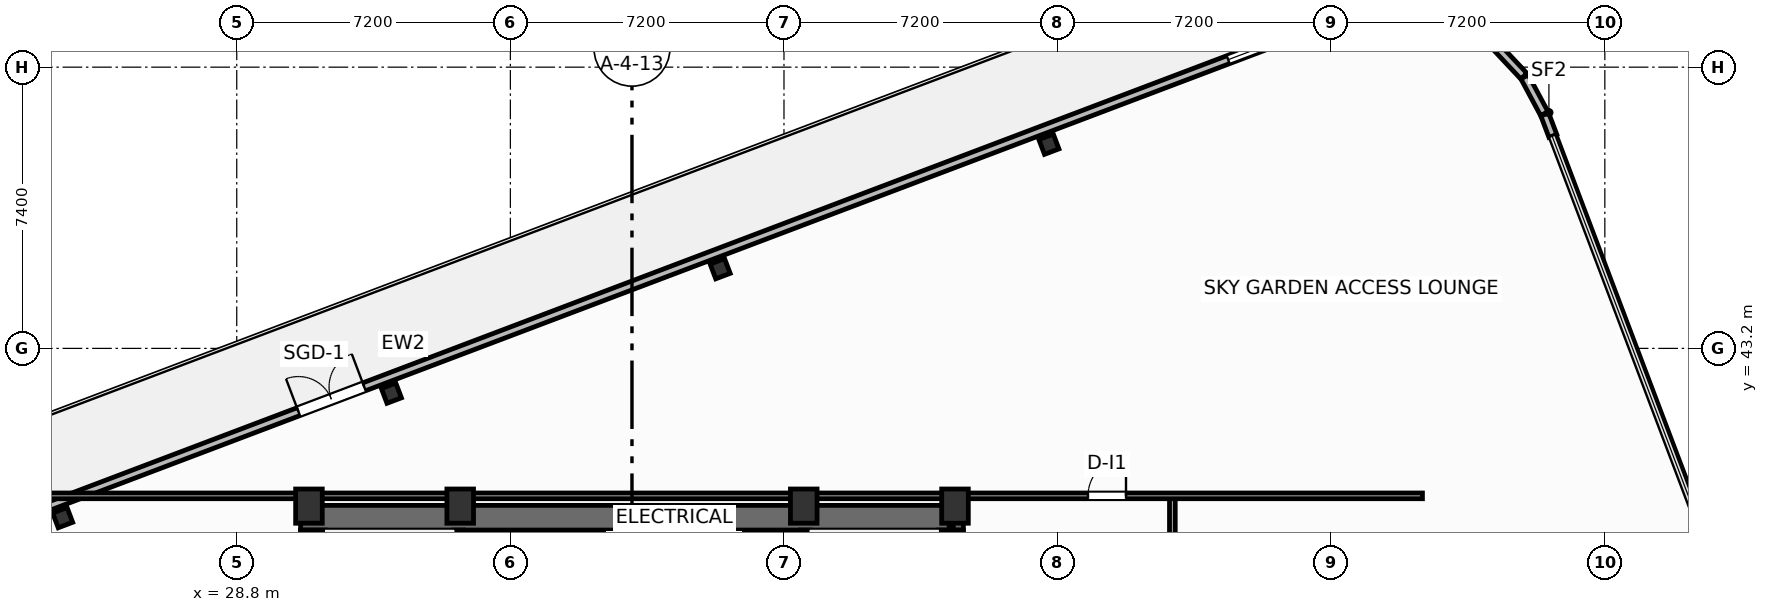
"""IFC4 building model, lengths in metres.
Left out: names, types, materials, properties, quantities, classifications, styles, units other than length and angle.
Written with IfcOpenShell. Run it as: python <this file> out.ifc"""

import sys

from ifc_helpers import new_model, si_unit, direction, frame, frame_2d, origin, origin_2d, place, context, subcontext, project, spatial, rectangle, i_section, extrude, element, fill, save


model = new_model("IFC4")
c1 = context("Model", 3, precision=1e-05, world=origin(), true_north=direction((0.0, 1.0)))
c2 = subcontext(c1, "Body", "Model", "MODEL_VIEW")
j1 = project(units=[si_unit("LENGTHUNIT", "METRE"), si_unit("PLANEANGLEUNIT", "RADIAN")], contexts=[c1])
p1 = place(None, origin())
s1 = spatial("IfcSite", under=j1, at=p1, CompositionType="ELEMENT")
p2 = place(p1, origin())
s2 = spatial("IfcBuilding", under=s1, at=p2, CompositionType="ELEMENT")
p3 = place(p2, frame((0.0, 0.0, 207.9)))
s3 = spatial("IfcBuildingStorey", under=s2, at=p3, CompositionType="ELEMENT", Elevation=207.9)
for number, where, z_axis, x_axis in (
    (1, (30.7, 39.05, 0.0), (0.0, 0.0, 1.0), (1.0, 0.0, 0.0)),
    (2, (34.68, 39.05, 0.0), (0.0, 0.0, 1.0), (1.0, 0.0, 0.0)),
    (3, (43.72, 39.05, 0.0), (0.0, 0.0, 1.0), (1.0, 0.0, 0.0)),
    (4, (47.7, 39.05, 0.0), (0.0, 0.0, 1.0), (1.0, 0.0, 0.0)),
):
    element("IfcColumn", number, at=place(p3, frame(where, z_axis=z_axis, x_axis=x_axis)), inside=s3, PredefinedType="COLUMN", context=c2, shape_type="SweptSolid", body=[
        extrude(rectangle(XDim=0.7, YDim=0.9, at=origin_2d()), origin(), (0.0, 0.0, 1.0), 4.8),
    ])
p4 = place(p3, frame((30.48, 38.745, 0.0), z_axis=(0.0, 0.0, 1.0), x_axis=(1.0, 0.0, 0.0)))
e5 = element("IfcWall", 5, at=p4, inside=s3, PredefinedType="SHEAR", context=c2, shape_type="SweptSolid", body=[
    extrude(rectangle(XDim=17.44, YDim=0.65, at=frame_2d((8.72, 0.0))), origin(), (0.0, 0.0, 1.0), 4.55),
])
for number, where, z_axis, x_axis in (
    (6, (30.805, 29.2, 0.0), (0.0, 0.0, 1.0), (0.0, 1.0, 0.0)),
    (7, (47.595, 29.2, 0.0), (0.0, 0.0, 1.0), (0.0, 1.0, 0.0)),
):
    element("IfcWall", number, at=place(p3, frame(where, z_axis=z_axis, x_axis=x_axis)), inside=s3, PredefinedType="SHEAR", context=c2, shape_type="SweptSolid", body=[
        extrude(rectangle(XDim=9.22, YDim=0.65, at=frame_2d((4.61, 0.0))), origin(), (0.0, 0.0, 1.0), 4.55),
    ])
p5 = place(p3, frame((34.64, 29.2, 0.0), z_axis=(0.0, 0.0, 1.0), x_axis=(0.0, 1.0, 0.0)))
e8 = element("IfcWall", 8, at=p5, inside=s3, PredefinedType="SHEAR", context=c2, shape_type="SweptSolid", body=[
    extrude(rectangle(XDim=9.22, YDim=0.25, at=frame_2d((4.61, 0.0))), origin(), (0.0, 0.0, 1.0), 4.55),
])
p6 = place(p5, frame((0.65, 0.0, 0.0)))
e9 = element("IfcOpeningElement", 9, at=p6, cuts=e8, PredefinedType="OPENING", context=c2, shape_type="SweptSolid", body=[
    extrude(rectangle(XDim=1.05, YDim=2.15, at=frame_2d((0.525, 1.075))), frame((0.0, 0.135, 0.0), z_axis=(0.0, -1.0, 0.0), x_axis=(1.0, 0.0, 0.0)), (0.0, 0.0, 1.0), 0.27),
])
p7 = place(p3, frame((43.76, 29.2, 0.0), z_axis=(0.0, 0.0, 1.0), x_axis=(0.0, 1.0, 0.0)))
e10 = element("IfcWall", 10, at=p7, inside=s3, PredefinedType="SHEAR", context=c2, shape_type="SweptSolid", body=[
    extrude(rectangle(XDim=9.22, YDim=0.25, at=frame_2d((4.61, 0.0))), origin(), (0.0, 0.0, 1.0), 4.55),
])
p8 = place(p7, frame((0.65, 0.0, 0.0)))
e11 = element("IfcOpeningElement", 11, at=p8, cuts=e10, PredefinedType="OPENING", context=c2, shape_type="SweptSolid", body=[
    extrude(rectangle(XDim=1.05, YDim=2.15, at=frame_2d((0.525, 1.075))), frame((0.0, 0.135, 0.0), z_axis=(0.0, -1.0, 0.0), x_axis=(1.0, 0.0, 0.0)), (0.0, 0.0, 1.0), 0.27),
])
for number, where, z_axis, x_axis in (
    (12, (50.171, 48.572, -0.32), (0.0, 0.0, 1.0), (0.935, 0.354, 0.0)),
    (13, (41.52, 45.297, -0.32), (0.0, 0.0, 1.0), (0.935, 0.354, 0.0)),
    (14, (32.869, 42.022, -0.32), (0.0, 0.0, 1.0), (0.935, 0.354, 0.0)),
    (15, (24.219, 38.747, -0.32), (0.0, 0.0, 1.0), (0.935, 0.354, 0.0)),
):
    element("IfcColumn", number, at=place(p3, frame(where, z_axis=z_axis, x_axis=x_axis)), inside=s3, PredefinedType="COLUMN", context=c2, shape_type="SweptSolid", body=[
        extrude(i_section(OverallWidth=0.406, OverallDepth=0.416, WebThickness=0.03, FlangeThickness=0.048, FilletRadius=0.025, at=origin_2d()), origin(), (0.0, 0.0, 1.0), 5.12),
    ])
p9 = place(p3, frame((8.315, 33.164, 0.0), z_axis=(0.0, 0.0, 1.0), x_axis=(0.935222646765, 0.354060165759, 0.0)))
e16 = element("IfcWall", 16, at=p9, inside=s3, PredefinedType="SOLIDWALL", context=c2, shape_type="SweptSolid", body=[
    extrude(rectangle(XDim=52.2, YDim=0.22, at=frame_2d((26.1, 0.0))), origin(), (0.0, 0.0, 1.0), 3.83),
])
p10 = place(p9, frame((23.64, 0.0, 0.0)))
e17 = element("IfcOpeningElement", 17, at=p10, cuts=e16, PredefinedType="OPENING", context=c2, shape_type="SweptSolid", body=[
    extrude(rectangle(XDim=1.85, YDim=2.3, at=frame_2d((0.925, 1.15))), frame((0.0, 0.12, 0.0), z_axis=(0.0, -1.0, 0.0), x_axis=(1.0, 0.0, 0.0)), (0.0, 0.0, 1.0), 0.24),
])
p11 = place(p9, frame((0.55, 0.0, 0.75)))
e18 = element("IfcOpeningElement", 18, at=p11, cuts=e16, PredefinedType="OPENING", context=c2, shape_type="SweptSolid", body=[
    extrude(rectangle(XDim=1.85, YDim=1.75, at=frame_2d((0.925, 0.875))), frame((0.0, 0.12, 0.0), z_axis=(0.0, -1.0, 0.0), x_axis=(1.0, 0.0, 0.0)), (0.0, 0.0, 1.0), 0.24),
])
p12 = place(p9, frame((49.8, 0.0, 0.75)))
e19 = element("IfcOpeningElement", 19, at=p12, cuts=e16, PredefinedType="OPENING", context=c2, shape_type="SweptSolid", body=[
    extrude(rectangle(XDim=1.85, YDim=1.75, at=frame_2d((0.925, 0.875))), frame((0.0, 0.12, 0.0), z_axis=(0.0, -1.0, 0.0), x_axis=(1.0, 0.0, 0.0)), (0.0, 0.0, 1.0), 0.24),
])
p13 = place(p3, frame((63.432, 48.792, 0.0), z_axis=(0.0, 0.0, 1.0), x_axis=(-0.354409739857, 0.935090228959, 0.0)))
e20 = element("IfcWall", 20, at=p13, inside=s3, PredefinedType="SOLIDWALL", context=c2, shape_type="SweptSolid", body=[
    extrude(rectangle(XDim=0.602, YDim=0.22, at=frame_2d((0.301, 0.0))), origin(), (0.0, 0.0, 1.0), 3.83),
])
p14 = place(p3, frame((63.207, 49.377, 0.0), z_axis=(0.0, 0.0, 1.0), x_axis=(-0.473040490473, 0.881040688262, 0.0)))
e21 = element("IfcWall", 21, at=p14, inside=s3, PredefinedType="SOLIDWALL", context=c2, shape_type="SweptSolid", body=[
    extrude(rectangle(XDim=1.1, YDim=0.22, at=frame_2d((0.55, 0.0))), origin(), (0.0, 0.0, 1.0), 3.83),
])
p15 = place(p3, frame((62.67, 50.364, 0.0), z_axis=(0.0, 0.0, 1.0), x_axis=(-0.685085671623, 0.728462505923, 0.0)))
e22 = element("IfcWall", 22, at=p15, inside=s3, PredefinedType="SOLIDWALL", context=c2, shape_type="SweptSolid", body=[
    extrude(rectangle(XDim=1.092, YDim=0.22, at=frame_2d((0.546, 0.0))), origin(), (0.0, 0.0, 1.0), 3.83),
])
p16 = place(p3, frame((53.42, 19.3, 0.0), z_axis=(0.0, 0.0, 1.0), x_axis=(0.0, 1.0, 0.0)))
e23 = element("IfcWall", 23, at=p16, inside=s3, PredefinedType="PARTITIONING", context=c2, shape_type="SweptSolid", body=[
    extrude(rectangle(XDim=20.02, YDim=0.15, at=frame_2d((10.01, 0.0))), origin(), (0.0, 0.0, 1.0), 4.55),
])
p17 = place(p16, frame((7.8, 0.0, 0.0)))
e24 = element("IfcOpeningElement", 24, at=p17, cuts=e23, PredefinedType="OPENING", context=c2, shape_type="SweptSolid", body=[
    extrude(rectangle(XDim=1.0, YDim=2.05, at=frame_2d((0.5, 1.025))), frame((0.0, 0.085, 0.0), z_axis=(0.0, -1.0, 0.0), x_axis=(1.0, 0.0, 0.0)), (0.0, 0.0, 1.0), 0.17),
])
p18 = place(p3, frame((20.0, 39.32, 0.0), z_axis=(0.0, 0.0, 1.0), x_axis=(1.0, 0.0, 0.0)))
e25 = element("IfcWall", 25, at=p18, inside=s3, PredefinedType="PARTITIONING", context=c2, shape_type="SweptSolid", body=[
    extrude(rectangle(XDim=40.0, YDim=0.15, at=frame_2d((20.0, 0.0))), origin(), (0.0, 0.0, 1.0), 4.55),
])
p19 = place(p18, frame((31.2, 0.0, 0.0)))
e26 = element("IfcOpeningElement", 26, at=p19, cuts=e25, PredefinedType="OPENING", context=c2, shape_type="SweptSolid", body=[
    extrude(rectangle(XDim=1.0, YDim=2.05, at=frame_2d((0.5, 1.025))), frame((0.0, 0.085, 0.0), z_axis=(0.0, -1.0, 0.0), x_axis=(1.0, 0.0, 0.0)), (0.0, 0.0, 1.0), 0.17),
])
p20 = place(p10, origin())
e27 = element("IfcDoor", 27, at=p20, inside=s3, OperationType="DOUBLE_DOOR_SINGLE_SWING", PredefinedType="DOOR", context=c2, shape_type="SweptSolid", body=[
    extrude(rectangle(XDim=1.85, YDim=2.3, at=frame_2d((0.925, 1.15))), frame((0.0, 0.025, 0.0), z_axis=(0.0, -1.0, 0.0), x_axis=(1.0, 0.0, 0.0)), (0.0, 0.0, 1.0), 0.05),
])
fill(e17, e27)
p21 = place(p12, origin())
e28 = element("IfcWindow", 28, at=p21, inside=s3, PartitioningType="SINGLE_PANEL", PredefinedType="WINDOW", context=c2, shape_type="SweptSolid", body=[
    extrude(rectangle(XDim=1.85, YDim=1.75, at=frame_2d((0.925, 0.875))), frame((0.0, 0.03, 0.0), z_axis=(0.0, -1.0, 0.0), x_axis=(1.0, 0.0, 0.0)), (0.0, 0.0, 1.0), 0.06),
])
fill(e19, e28)
p22 = place(p19, origin())
e29 = element("IfcDoor", 29, at=p22, inside=s3, OperationType="SINGLE_SWING_RIGHT", PredefinedType="DOOR", context=c2, shape_type="SweptSolid", body=[
    extrude(rectangle(XDim=1.0, YDim=2.05, at=frame_2d((0.5, 1.025))), frame((0.0, 0.025, 0.0), z_axis=(0.0, -1.0, 0.0), x_axis=(1.0, 0.0, 0.0)), (0.0, 0.0, 1.0), 0.05),
])
fill(e26, e29)
save(model, sys.argv[1])
